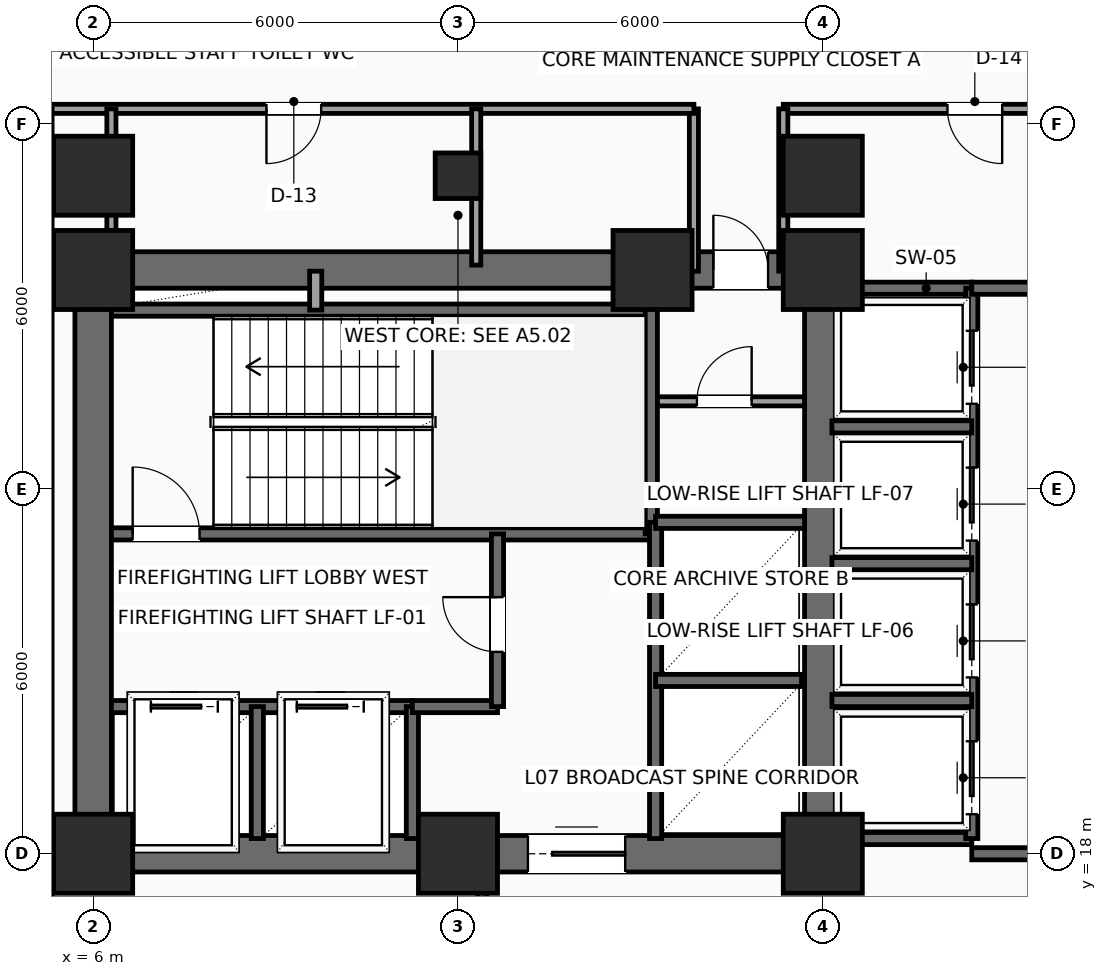
"""IFC4 building model, lengths in metres.
Left out: names, types, materials, properties, quantities, classifications, styles, units other than length and angle.
Written with IfcOpenShell. Run it as: python <this file> out.ifc"""

import sys

from ifc_helpers import new_model, si_unit, direction, frame, frame_2d, origin, origin_2d, place, context, subcontext, project, spatial, rectangle, hollow_rectangle, extrude, element, fill, save


model = new_model("IFC4")
c1 = context("Model", 3, precision=1e-05, world=origin(), true_north=direction((0.0, 1.0)))
c2 = subcontext(c1, "Body", "Model", "MODEL_VIEW")
j1 = project(units=[si_unit("LENGTHUNIT", "METRE"), si_unit("PLANEANGLEUNIT", "RADIAN")], contexts=[c1])
p1 = place(None, origin())
s1 = spatial("IfcSite", under=j1, at=p1, CompositionType="ELEMENT")
p2 = place(p1, origin())
s2 = spatial("IfcBuilding", under=s1, at=p2, CompositionType="ELEMENT")
p3 = place(p2, frame((0.0, 0.0, 36.3)))
s3 = spatial("IfcBuildingStorey", under=s2, at=p3, CompositionType="ELEMENT", Elevation=36.3)
for number, where, z_axis, x_axis in (
    (1, (6.0, 18.0, 0.0), (0.0, 0.0, 1.0), (1.0, 0.0, 0.0)),
    (2, (12.0, 18.0, 0.0), (0.0, 0.0, 1.0), (1.0, 0.0, 0.0)),
    (3, (18.0, 18.0, 0.0), (0.0, 0.0, 1.0), (1.0, 0.0, 0.0)),
    (4, (6.0, 27.6, 0.0), (0.0, 0.0, 1.0), (1.0, 0.0, 0.0)),
    (5, (15.2, 27.6, 0.0), (0.0, 0.0, 1.0), (1.0, 0.0, 0.0)),
    (6, (18.0, 27.6, 0.0), (0.0, 0.0, 1.0), (1.0, 0.0, 0.0)),
    (7, (6.0, 29.15, 0.0), (0.0, 0.0, 1.0), (1.0, 0.0, 0.0)),
):
    element("IfcColumn", number, at=place(p3, frame(where, z_axis=z_axis, x_axis=x_axis)), inside=s3, PredefinedType="COLUMN", context=c2, shape_type="SweptSolid", body=[
        extrude(rectangle(XDim=1.3, YDim=1.3, at=origin_2d()), origin(), (0.0, 0.0, 1.0), 3.9),
    ])
p4 = place(p3, frame((12.0, 29.15, 0.0), z_axis=(0.0, 0.0, 1.0), x_axis=(1.0, 0.0, 0.0)))
e8 = element("IfcColumn", 8, at=p4, inside=s3, PredefinedType="COLUMN", context=c2, shape_type="SweptSolid", body=[
    extrude(hollow_rectangle(XDim=0.75, YDim=0.75, WallThickness=0.035, InnerFilletRadius=0.035, OuterFilletRadius=0.05, at=origin_2d()), origin(), (0.0, 0.0, 1.0), 3.9),
])
p5 = place(p3, frame((18.0, 29.15, 0.0), z_axis=(0.0, 0.0, 1.0), x_axis=(1.0, 0.0, 0.0)))
e9 = element("IfcColumn", 9, at=p5, inside=s3, PredefinedType="COLUMN", context=c2, shape_type="SweptSolid", body=[
    extrude(rectangle(XDim=1.3, YDim=1.3, at=origin_2d()), origin(), (0.0, 0.0, 1.0), 3.9),
])
p6 = place(p3, frame((6.0, 18.0, 0.0), z_axis=(0.0, 0.0, 1.0), x_axis=(1.0, 0.0, 0.0)))
e10 = element("IfcWall", 10, at=p6, inside=s3, PredefinedType="SHEAR", context=c2, shape_type="SweptSolid", body=[
    extrude(rectangle(XDim=12.0, YDim=0.6, at=frame_2d((6.0, 0.0))), origin(), (0.0, 0.0, 1.0), 3.65),
])
p7 = place(p6, frame((7.15, 0.0, 0.0)))
e11 = element("IfcOpeningElement", 11, at=p7, cuts=e10, PredefinedType="OPENING", context=c2, shape_type="SweptSolid", body=[
    extrude(rectangle(XDim=1.6, YDim=2.3, at=frame_2d((0.8, 1.15))), frame((0.0, 0.31, 0.0), z_axis=(0.0, -1.0, 0.0), x_axis=(1.0, 0.0, 0.0)), (0.0, 0.0, 1.0), 0.62),
])
p8 = place(p3, frame((6.0, 27.6, 0.0), z_axis=(0.0, 0.0, 1.0), x_axis=(1.0, 0.0, 0.0)))
e12 = element("IfcWall", 12, at=p8, inside=s3, PredefinedType="SHEAR", context=c2, shape_type="SweptSolid", body=[
    extrude(rectangle(XDim=12.0, YDim=0.6, at=frame_2d((6.0, 0.0))), origin(), (0.0, 0.0, 1.0), 3.65),
])
p9 = place(p8, frame((10.2, 0.0, 0.0)))
e13 = element("IfcOpeningElement", 13, at=p9, cuts=e12, PredefinedType="OPENING", context=c2, shape_type="SweptSolid", body=[
    extrude(rectangle(XDim=0.9, YDim=2.15, at=frame_2d((0.45, 1.075))), frame((0.0, 0.31, 0.0), z_axis=(0.0, -1.0, 0.0), x_axis=(1.0, 0.0, 0.0)), (0.0, 0.0, 1.0), 0.62),
])
for number, where, z_axis, x_axis in (
    (14, (6.0, 18.0, 0.0), (0.0, 0.0, 1.0), (0.0, 1.0, 0.0)),
    (15, (18.0, 18.0, 0.0), (0.0, 0.0, 1.0), (0.0, 1.0, 0.0)),
):
    element("IfcWall", number, at=place(p3, frame(where, z_axis=z_axis, x_axis=x_axis)), inside=s3, PredefinedType="SHEAR", context=c2, shape_type="SweptSolid", body=[
        extrude(rectangle(XDim=9.6, YDim=0.6, at=frame_2d((4.8, 0.0))), origin(), (0.0, 0.0, 1.0), 3.65),
    ])
p10 = place(p3, frame((6.3, 23.26, 0.0), z_axis=(0.0, 0.0, 1.0), x_axis=(1.0, 0.0, 0.0)))
e16 = element("IfcWall", 16, at=p10, inside=s3, PredefinedType="SHEAR", context=c2, shape_type="SweptSolid", body=[
    extrude(rectangle(XDim=8.88, YDim=0.2, at=frame_2d((4.44, 0.0))), origin(), (0.0, 0.0, 1.0), 3.65),
])
p11 = place(p10, frame((0.35, 0.0, 0.0)))
e17 = element("IfcOpeningElement", 17, at=p11, cuts=e16, PredefinedType="OPENING", context=c2, shape_type="SweptSolid", body=[
    extrude(rectangle(XDim=1.1, YDim=2.2, at=frame_2d((0.55, 1.1))), frame((0.0, 0.11, 0.0), z_axis=(0.0, -1.0, 0.0), x_axis=(1.0, 0.0, 0.0)), (0.0, 0.0, 1.0), 0.22),
])
p12 = place(p3, frame((6.3, 26.94, 0.0), z_axis=(0.0, 0.0, 1.0), x_axis=(1.0, 0.0, 0.0)))
e18 = element("IfcWall", 18, at=p12, inside=s3, PredefinedType="SHEAR", context=c2, shape_type="SweptSolid", body=[
    extrude(rectangle(XDim=8.88, YDim=0.2, at=frame_2d((4.44, 0.0))), origin(), (0.0, 0.0, 1.0), 3.65),
])
p13 = place(p3, frame((15.18, 23.26, 0.0), z_axis=(0.0, 0.0, 1.0), x_axis=(0.0, 1.0, 0.0)))
e19 = element("IfcWall", 19, at=p13, inside=s3, PredefinedType="SHEAR", context=c2, shape_type="SweptSolid", body=[
    extrude(rectangle(XDim=4.04, YDim=0.2, at=frame_2d((2.02, 0.0))), origin(), (0.0, 0.0, 1.0), 3.65),
])
p14 = place(p3, frame((6.3, 20.42, 0.0), z_axis=(0.0, 0.0, 1.0), x_axis=(1.0, 0.0, 0.0)))
e20 = element("IfcWall", 20, at=p14, inside=s3, PredefinedType="SHEAR", context=c2, shape_type="SweptSolid", body=[
    extrude(rectangle(XDim=4.95, YDim=0.2, at=frame_2d((2.475, 0.0))), origin(), (0.0, 0.0, 1.0), 3.65),
])
p15 = place(p14, frame((0.65, 0.0, 0.0)))
e21 = element("IfcOpeningElement", 21, at=p15, cuts=e20, PredefinedType="OPENING", context=c2, shape_type="SweptSolid", body=[
    extrude(rectangle(XDim=1.1, YDim=2.2, at=frame_2d((0.55, 1.1))), frame((0.0, 0.11, 0.0), z_axis=(0.0, -1.0, 0.0), x_axis=(1.0, 0.0, 0.0)), (0.0, 0.0, 1.0), 0.22),
])
p16 = place(p14, frame((3.05, 0.0, 0.0)))
e22 = element("IfcOpeningElement", 22, at=p16, cuts=e20, PredefinedType="OPENING", context=c2, shape_type="SweptSolid", body=[
    extrude(rectangle(XDim=1.1, YDim=2.2, at=frame_2d((0.55, 1.1))), frame((0.0, 0.11, 0.0), z_axis=(0.0, -1.0, 0.0), x_axis=(1.0, 0.0, 0.0)), (0.0, 0.0, 1.0), 0.22),
])
for number, where, z_axis, x_axis in (
    (23, (8.7, 18.25, 0.0), (0.0, 0.0, 1.0), (0.0, 1.0, 0.0)),
    (24, (11.25, 18.25, 0.0), (0.0, 0.0, 1.0), (0.0, 1.0, 0.0)),
):
    element("IfcWall", number, at=place(p3, frame(where, z_axis=z_axis, x_axis=x_axis)), inside=s3, PredefinedType="SHEAR", context=c2, shape_type="SweptSolid", body=[
        extrude(rectangle(XDim=2.17, YDim=0.2, at=frame_2d((1.085, 0.0))), origin(), (0.0, 0.0, 1.0), 3.65),
    ])
p17 = place(p3, frame((11.25, 20.42, 0.0), z_axis=(0.0, 0.0, 1.0), x_axis=(1.0, 0.0, 0.0)))
e25 = element("IfcWall", 25, at=p17, inside=s3, PredefinedType="SHEAR", context=c2, shape_type="SweptSolid", body=[
    extrude(rectangle(XDim=1.4, YDim=0.2, at=frame_2d((0.7, 0.0))), origin(), (0.0, 0.0, 1.0), 3.65),
])
p18 = place(p3, frame((12.65, 20.42, 0.0), z_axis=(0.0, 0.0, 1.0), x_axis=(0.0, 1.0, 0.0)))
e26 = element("IfcWall", 26, at=p18, inside=s3, PredefinedType="SHEAR", context=c2, shape_type="SweptSolid", body=[
    extrude(rectangle(XDim=2.84, YDim=0.2, at=frame_2d((1.42, 0.0))), origin(), (0.0, 0.0, 1.0), 3.65),
])
p19 = place(p18, frame((0.9, 0.0, 0.0)))
e27 = element("IfcOpeningElement", 27, at=p19, cuts=e26, PredefinedType="OPENING", context=c2, shape_type="SweptSolid", body=[
    extrude(rectangle(XDim=0.9, YDim=2.15, at=frame_2d((0.45, 1.075))), frame((0.0, 0.11, 0.0), z_axis=(0.0, -1.0, 0.0), x_axis=(1.0, 0.0, 0.0)), (0.0, 0.0, 1.0), 0.22),
])
p20 = place(p3, frame((9.66, 26.94, 0.0), z_axis=(0.0, 0.0, 1.0), x_axis=(0.0, 1.0, 0.0)))
e28 = element("IfcWall", 28, at=p20, inside=s3, PredefinedType="SOLIDWALL", context=c2, shape_type="SweptSolid", body=[
    extrude(rectangle(XDim=0.64, YDim=0.2, at=frame_2d((0.32, 0.0))), origin(), (0.0, 0.0, 1.0), 3.65),
])
p21 = place(p3, frame((15.25, 18.25, 0.0), z_axis=(0.0, 0.0, 1.0), x_axis=(0.0, 1.0, 0.0)))
e29 = element("IfcWall", 29, at=p21, inside=s3, PredefinedType="SHEAR", context=c2, shape_type="SweptSolid", body=[
    extrude(rectangle(XDim=5.2, YDim=0.2, at=frame_2d((2.6, 0.0))), origin(), (0.0, 0.0, 1.0), 3.65),
])
p22 = place(p3, frame((15.25, 20.85, 0.0), z_axis=(0.0, 0.0, 1.0), x_axis=(1.0, 0.0, 0.0)))
e30 = element("IfcWall", 30, at=p22, inside=s3, PredefinedType="SHEAR", context=c2, shape_type="SweptSolid", body=[
    extrude(rectangle(XDim=2.4, YDim=0.2, at=frame_2d((1.2, 0.0))), origin(), (0.0, 0.0, 1.0), 3.65),
])
p23 = place(p3, frame((15.25, 23.45, 0.0), z_axis=(0.0, 0.0, 1.0), x_axis=(1.0, 0.0, 0.0)))
e31 = element("IfcWall", 31, at=p23, inside=s3, PredefinedType="SHEAR", context=c2, shape_type="SweptSolid", body=[
    extrude(rectangle(XDim=2.45, YDim=0.2, at=frame_2d((1.225, 0.0))), origin(), (0.0, 0.0, 1.0), 3.65),
])
p24 = place(p3, frame((15.28, 25.44, 0.0), z_axis=(0.0, 0.0, 1.0), x_axis=(1.0, 0.0, 0.0)))
e32 = element("IfcWall", 32, at=p24, inside=s3, PredefinedType="PARTITIONING", context=c2, shape_type="SweptSolid", body=[
    extrude(rectangle(XDim=2.42, YDim=0.15, at=frame_2d((1.21, 0.0))), origin(), (0.0, 0.0, 1.0), 3.65),
])
p25 = place(p24, frame((0.65, 0.0, 0.0)))
e33 = element("IfcOpeningElement", 33, at=p25, cuts=e32, PredefinedType="OPENING", context=c2, shape_type="SweptSolid", body=[
    extrude(rectangle(XDim=0.9, YDim=2.15, at=frame_2d((0.45, 1.075))), frame((0.0, 0.085, 0.0), z_axis=(0.0, -1.0, 0.0), x_axis=(1.0, 0.0, 0.0)), (0.0, 0.0, 1.0), 0.17),
])
for number, where, z_axis, x_axis in (
    (34, (18.1, 27.3, 0.0), (0.0, 0.0, 1.0), (1.0, 0.0, 0.0)),
    (35, (18.1, 18.25, 0.0), (0.0, 0.0, 1.0), (1.0, 0.0, 0.0)),
):
    element("IfcWall", number, at=place(p3, frame(where, z_axis=z_axis, x_axis=x_axis)), inside=s3, PredefinedType="SHEAR", context=c2, shape_type="SweptSolid", body=[
        extrude(rectangle(XDim=2.35, YDim=0.2, at=frame_2d((1.175, 0.0))), origin(), (0.0, 0.0, 1.0), 3.65),
    ])
p26 = place(p3, frame((20.45, 18.25, 0.0), z_axis=(0.0, 0.0, 1.0), x_axis=(0.0, 1.0, 0.0)))
e36 = element("IfcWall", 36, at=p26, inside=s3, PredefinedType="SHEAR", context=c2, shape_type="SweptSolid", body=[
    extrude(rectangle(XDim=9.05, YDim=0.2, at=frame_2d((4.525, 0.0))), origin(), (0.0, 0.0, 1.0), 3.65),
])
p27 = place(p26, frame((0.4, 0.0, 0.0)))
e37 = element("IfcOpeningElement", 37, at=p27, cuts=e36, PredefinedType="OPENING", context=c2, shape_type="SweptSolid", body=[
    extrude(rectangle(XDim=1.2, YDim=2.2, at=frame_2d((0.6, 1.1))), frame((0.0, 0.11, 0.0), z_axis=(0.0, -1.0, 0.0), x_axis=(1.0, 0.0, 0.0)), (0.0, 0.0, 1.0), 0.22),
])
p28 = place(p26, frame((2.65, 0.0, 0.0)))
e38 = element("IfcOpeningElement", 38, at=p28, cuts=e36, PredefinedType="OPENING", context=c2, shape_type="SweptSolid", body=[
    extrude(rectangle(XDim=1.2, YDim=2.2, at=frame_2d((0.6, 1.1))), frame((0.0, 0.11, 0.0), z_axis=(0.0, -1.0, 0.0), x_axis=(1.0, 0.0, 0.0)), (0.0, 0.0, 1.0), 0.22),
])
p29 = place(p26, frame((4.9, 0.0, 0.0)))
e39 = element("IfcOpeningElement", 39, at=p29, cuts=e36, PredefinedType="OPENING", context=c2, shape_type="SweptSolid", body=[
    extrude(rectangle(XDim=1.2, YDim=2.2, at=frame_2d((0.6, 1.1))), frame((0.0, 0.11, 0.0), z_axis=(0.0, -1.0, 0.0), x_axis=(1.0, 0.0, 0.0)), (0.0, 0.0, 1.0), 0.22),
])
p30 = place(p26, frame((7.15, 0.0, 0.0)))
e40 = element("IfcOpeningElement", 40, at=p30, cuts=e36, PredefinedType="OPENING", context=c2, shape_type="SweptSolid", body=[
    extrude(rectangle(XDim=1.2, YDim=2.2, at=frame_2d((0.6, 1.1))), frame((0.0, 0.11, 0.0), z_axis=(0.0, -1.0, 0.0), x_axis=(1.0, 0.0, 0.0)), (0.0, 0.0, 1.0), 0.22),
])
for number, where, z_axis, x_axis in (
    (41, (18.15, 20.52, 0.0), (0.0, 0.0, 1.0), (1.0, 0.0, 0.0)),
    (42, (18.15, 22.77, 0.0), (0.0, 0.0, 1.0), (1.0, 0.0, 0.0)),
    (43, (18.15, 25.02, 0.0), (0.0, 0.0, 1.0), (1.0, 0.0, 0.0)),
):
    element("IfcWall", number, at=place(p3, frame(where, z_axis=z_axis, x_axis=x_axis)), inside=s3, PredefinedType="SHEAR", context=c2, shape_type="SweptSolid", body=[
        extrude(rectangle(XDim=2.3, YDim=0.2, at=frame_2d((1.15, 0.0))), origin(), (0.0, 0.0, 1.0), 3.65),
    ])
p31 = place(p3, frame((20.45, 18.0, 0.0), z_axis=(0.0, 0.0, 1.0), x_axis=(1.0, 0.0, 0.0)))
e44 = element("IfcWall", 44, at=p31, inside=s3, PredefinedType="SHEAR", context=c2, shape_type="SweptSolid", body=[
    extrude(rectangle(XDim=3.5, YDim=0.2, at=frame_2d((1.75, 0.0))), origin(), (0.0, 0.0, 1.0), 3.65),
])
p32 = place(p31, frame((0.95, 0.0, 0.0)))
e45 = element("IfcOpeningElement", 45, at=p32, cuts=e44, PredefinedType="OPENING", context=c2, shape_type="SweptSolid", body=[
    extrude(rectangle(XDim=1.6, YDim=2.3, at=frame_2d((0.8, 1.15))), frame((0.0, 0.11, 0.0), z_axis=(0.0, -1.0, 0.0), x_axis=(1.0, 0.0, 0.0)), (0.0, 0.0, 1.0), 0.22),
])
p33 = place(p3, frame((20.45, 27.3, 0.0), z_axis=(0.0, 0.0, 1.0), x_axis=(1.0, 0.0, 0.0)))
e46 = element("IfcWall", 46, at=p33, inside=s3, PredefinedType="SHEAR", context=c2, shape_type="SweptSolid", body=[
    extrude(rectangle(XDim=3.5, YDim=0.2, at=frame_2d((1.75, 0.0))), origin(), (0.0, 0.0, 1.0), 3.65),
])
p34 = place(p3, frame((23.7, 30.25, 0.0), z_axis=(0.0, 0.0, 1.0), x_axis=(-1.0, 0.0, 0.0)))
e47 = element("IfcWall", 47, at=p34, inside=s3, PredefinedType="PARTITIONING", context=c2, shape_type="SweptSolid", body=[
    extrude(rectangle(XDim=6.35, YDim=0.15, at=frame_2d((3.175, 0.0))), origin(), (0.0, 0.0, 1.0), 3.65),
])
p35 = place(p34, frame((2.75, 0.0, 0.0)))
e48 = element("IfcOpeningElement", 48, at=p35, cuts=e47, PredefinedType="OPENING", context=c2, shape_type="SweptSolid", body=[
    extrude(rectangle(XDim=0.9, YDim=2.1, at=frame_2d((0.45, 1.05))), frame((0.0, 0.085, 0.0), z_axis=(0.0, -1.0, 0.0), x_axis=(1.0, 0.0, 0.0)), (0.0, 0.0, 1.0), 0.17),
])
for number, where, z_axis, x_axis in (
    (49, (17.35, 30.25, 0.0), (0.0, 0.0, 1.0), (0.0, -1.0, 0.0)),
    (50, (15.88, 27.58, 0.0), (0.0, 0.0, 1.0), (0.0, 1.0, 0.0)),
):
    element("IfcWall", number, at=place(p3, frame(where, z_axis=z_axis, x_axis=x_axis)), inside=s3, PredefinedType="PARTITIONING", context=c2, shape_type="SweptSolid", body=[
        extrude(rectangle(XDim=2.67, YDim=0.15, at=frame_2d((1.335, 0.0))), origin(), (0.0, 0.0, 1.0), 3.65),
    ])
p36 = place(p3, frame((15.88, 30.25, 0.0), z_axis=(0.0, 0.0, 1.0), x_axis=(-1.0, 0.0, 0.0)))
e51 = element("IfcWall", 51, at=p36, inside=s3, PredefinedType="PARTITIONING", context=c2, shape_type="SweptSolid", body=[
    extrude(rectangle(XDim=10.63, YDim=0.15, at=frame_2d((5.315, 0.0))), origin(), (0.0, 0.0, 1.0), 3.65),
])
p37 = place(p36, frame((6.13, 0.0, 0.0)))
e52 = element("IfcOpeningElement", 52, at=p37, cuts=e51, PredefinedType="OPENING", context=c2, shape_type="SweptSolid", body=[
    extrude(rectangle(XDim=0.9, YDim=2.1, at=frame_2d((0.45, 1.05))), frame((0.0, 0.085, 0.0), z_axis=(0.0, -1.0, 0.0), x_axis=(1.0, 0.0, 0.0)), (0.0, 0.0, 1.0), 0.17),
])
p38 = place(p3, frame((5.25, 30.25, 0.0), z_axis=(0.0, 0.0, 1.0), x_axis=(0.0, -1.0, 0.0)))
e53 = element("IfcWall", 53, at=p38, inside=s3, PredefinedType="PARTITIONING", context=c2, shape_type="SweptSolid", body=[
    extrude(rectangle(XDim=14.1, YDim=0.15, at=frame_2d((7.05, 0.0))), origin(), (0.0, 0.0, 1.0), 3.65),
])
p39 = place(p3, frame((12.4, 16.15, 0.0), z_axis=(0.0, 0.0, 1.0), x_axis=(0.0, 1.0, 0.0)))
e54 = element("IfcWall", 54, at=p39, inside=s3, PredefinedType="PARTITIONING", context=c2, shape_type="SweptSolid", body=[
    extrude(rectangle(XDim=1.8, YDim=0.15, at=frame_2d((0.9, 0.0))), origin(), (0.0, 0.0, 1.0), 3.65),
])
for number, where, z_axis, x_axis in (
    (55, (6.3, 27.68, 0.0), (0.0, 0.0, 1.0), (0.0, 1.0, 0.0)),
    (56, (12.3, 27.68, 0.0), (0.0, 0.0, 1.0), (0.0, 1.0, 0.0)),
):
    element("IfcWall", number, at=place(p3, frame(where, z_axis=z_axis, x_axis=x_axis)), inside=s3, PredefinedType="PARTITIONING", context=c2, shape_type="SweptSolid", body=[
        extrude(rectangle(XDim=2.57, YDim=0.15, at=frame_2d((1.285, 0.0))), origin(), (0.0, 0.0, 1.0), 2.992),
    ])
p40 = place(p7, origin())
e57 = element("IfcDoor", 57, at=p40, inside=s3, OperationType="DOUBLE_DOOR_SLIDING", PredefinedType="DOOR", context=c2, shape_type="SweptSolid", body=[
    extrude(rectangle(XDim=1.6, YDim=2.3, at=frame_2d((0.8, 1.15))), frame((0.0, 0.025, 0.0), z_axis=(0.0, -1.0, 0.0), x_axis=(1.0, 0.0, 0.0)), (0.0, 0.0, 1.0), 0.05),
])
fill(e11, e57)
p41 = place(p9, origin())
e58 = element("IfcDoor", 58, at=p41, inside=s3, OperationType="SINGLE_SWING_LEFT", PredefinedType="DOOR", context=c2, shape_type="SweptSolid", body=[
    extrude(rectangle(XDim=0.9, YDim=2.15, at=frame_2d((0.45, 1.075))), frame((0.0, 0.025, 0.0), z_axis=(0.0, -1.0, 0.0), x_axis=(1.0, 0.0, 0.0)), (0.0, 0.0, 1.0), 0.05),
])
fill(e13, e58)
p42 = place(p11, origin())
e59 = element("IfcDoor", 59, at=p42, inside=s3, OperationType="SINGLE_SWING_LEFT", PredefinedType="DOOR", context=c2, shape_type="SweptSolid", body=[
    extrude(rectangle(XDim=1.1, YDim=2.2, at=frame_2d((0.55, 1.1))), frame((0.0, 0.025, 0.0), z_axis=(0.0, -1.0, 0.0), x_axis=(1.0, 0.0, 0.0)), (0.0, 0.0, 1.0), 0.05),
])
fill(e17, e59)
p43 = place(p15, origin())
e60 = element("IfcDoor", 60, at=p43, inside=s3, OperationType="SLIDING_TO_LEFT", PredefinedType="DOOR", context=c2, shape_type="SweptSolid", body=[
    extrude(rectangle(XDim=1.1, YDim=2.2, at=frame_2d((0.55, 1.1))), frame((0.0, 0.025, 0.0), z_axis=(0.0, -1.0, 0.0), x_axis=(1.0, 0.0, 0.0)), (0.0, 0.0, 1.0), 0.05),
])
fill(e21, e60)
p44 = place(p16, origin())
e61 = element("IfcDoor", 61, at=p44, inside=s3, OperationType="SLIDING_TO_LEFT", PredefinedType="DOOR", context=c2, shape_type="SweptSolid", body=[
    extrude(rectangle(XDim=1.1, YDim=2.2, at=frame_2d((0.55, 1.1))), frame((0.0, 0.025, 0.0), z_axis=(0.0, -1.0, 0.0), x_axis=(1.0, 0.0, 0.0)), (0.0, 0.0, 1.0), 0.05),
])
fill(e22, e61)
p45 = place(p19, origin())
e62 = element("IfcDoor", 62, at=p45, inside=s3, OperationType="SINGLE_SWING_RIGHT", PredefinedType="DOOR", context=c2, shape_type="SweptSolid", body=[
    extrude(rectangle(XDim=0.9, YDim=2.15, at=frame_2d((0.45, 1.075))), frame((0.0, 0.025, 0.0), z_axis=(0.0, -1.0, 0.0), x_axis=(1.0, 0.0, 0.0)), (0.0, 0.0, 1.0), 0.05),
])
fill(e27, e62)
p46 = place(p25, origin())
e63 = element("IfcDoor", 63, at=p46, inside=s3, OperationType="SINGLE_SWING_RIGHT", PredefinedType="DOOR", context=c2, shape_type="SweptSolid", body=[
    extrude(rectangle(XDim=0.9, YDim=2.15, at=frame_2d((0.45, 1.075))), frame((0.0, 0.025, 0.0), z_axis=(0.0, -1.0, 0.0), x_axis=(1.0, 0.0, 0.0)), (0.0, 0.0, 1.0), 0.05),
])
fill(e33, e63)
p47 = place(p27, origin())
e64 = element("IfcDoor", 64, at=p47, inside=s3, OperationType="SLIDING_TO_RIGHT", PredefinedType="DOOR", context=c2, shape_type="SweptSolid", body=[
    extrude(rectangle(XDim=1.2, YDim=2.2, at=frame_2d((0.6, 1.1))), frame((0.0, 0.025, 0.0), z_axis=(0.0, -1.0, 0.0), x_axis=(1.0, 0.0, 0.0)), (0.0, 0.0, 1.0), 0.05),
])
fill(e37, e64)
p48 = place(p28, origin())
e65 = element("IfcDoor", 65, at=p48, inside=s3, OperationType="SLIDING_TO_RIGHT", PredefinedType="DOOR", context=c2, shape_type="SweptSolid", body=[
    extrude(rectangle(XDim=1.2, YDim=2.2, at=frame_2d((0.6, 1.1))), frame((0.0, 0.025, 0.0), z_axis=(0.0, -1.0, 0.0), x_axis=(1.0, 0.0, 0.0)), (0.0, 0.0, 1.0), 0.05),
])
fill(e38, e65)
p49 = place(p29, origin())
e66 = element("IfcDoor", 66, at=p49, inside=s3, OperationType="SLIDING_TO_RIGHT", PredefinedType="DOOR", context=c2, shape_type="SweptSolid", body=[
    extrude(rectangle(XDim=1.2, YDim=2.2, at=frame_2d((0.6, 1.1))), frame((0.0, 0.025, 0.0), z_axis=(0.0, -1.0, 0.0), x_axis=(1.0, 0.0, 0.0)), (0.0, 0.0, 1.0), 0.05),
])
fill(e39, e66)
p50 = place(p30, origin())
e67 = element("IfcDoor", 67, at=p50, inside=s3, OperationType="SLIDING_TO_RIGHT", PredefinedType="DOOR", context=c2, shape_type="SweptSolid", body=[
    extrude(rectangle(XDim=1.2, YDim=2.2, at=frame_2d((0.6, 1.1))), frame((0.0, 0.025, 0.0), z_axis=(0.0, -1.0, 0.0), x_axis=(1.0, 0.0, 0.0)), (0.0, 0.0, 1.0), 0.05),
])
fill(e40, e67)
p51 = place(p35, origin())
e68 = element("IfcDoor", 68, at=p51, inside=s3, OperationType="SINGLE_SWING_LEFT", PredefinedType="DOOR", context=c2, shape_type="SweptSolid", body=[
    extrude(rectangle(XDim=0.9, YDim=2.1, at=frame_2d((0.45, 1.05))), frame((0.0, 0.025, 0.0), z_axis=(0.0, -1.0, 0.0), x_axis=(1.0, 0.0, 0.0)), (0.0, 0.0, 1.0), 0.05),
])
fill(e48, e68)
p52 = place(p37, origin())
e69 = element("IfcDoor", 69, at=p52, inside=s3, OperationType="SINGLE_SWING_RIGHT", PredefinedType="DOOR", context=c2, shape_type="SweptSolid", body=[
    extrude(rectangle(XDim=0.9, YDim=2.1, at=frame_2d((0.45, 1.05))), frame((0.0, 0.025, 0.0), z_axis=(0.0, -1.0, 0.0), x_axis=(1.0, 0.0, 0.0)), (0.0, 0.0, 1.0), 0.05),
])
fill(e52, e69)
save(model, sys.argv[1])
